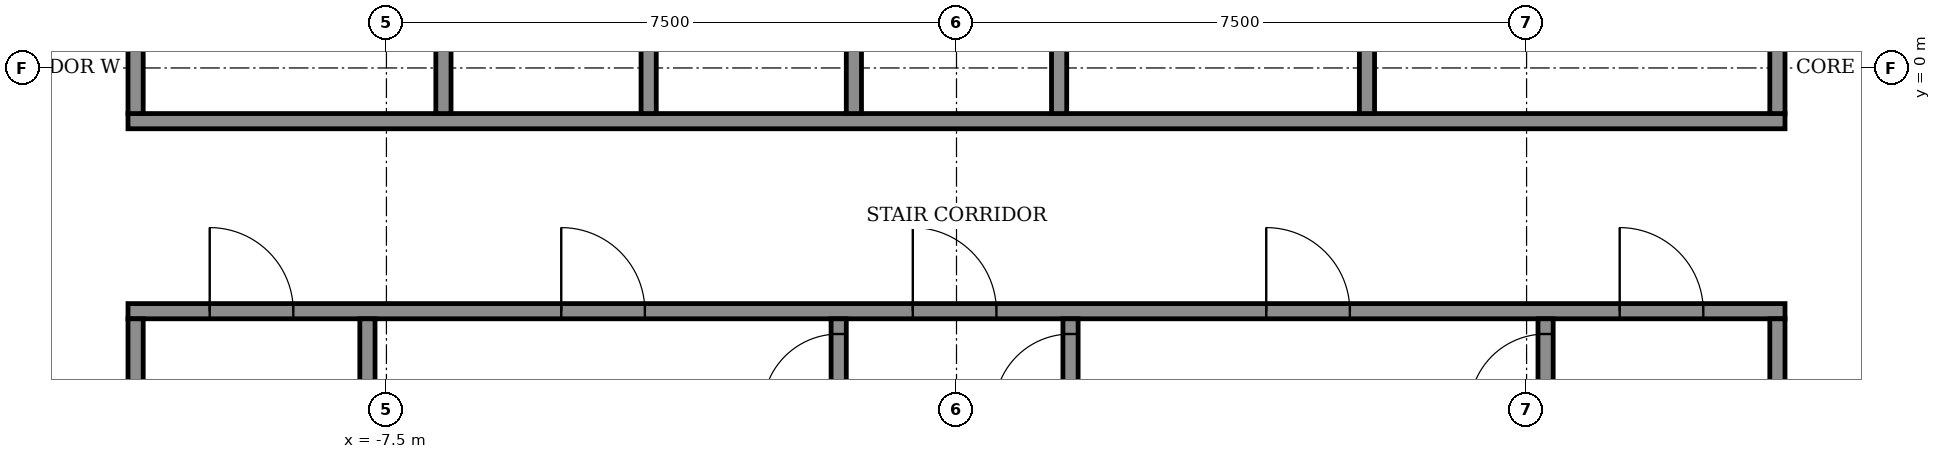
"""IFC4 building model, lengths in metres.
Left out: names, types, materials, properties, quantities, classifications, styles, units other than length and angle.
Written with IfcOpenShell. Run it as: python <this file> out.ifc"""

import sys

from ifc_helpers import new_model, si_unit, direction, frame, frame_2d, origin, place, context, subcontext, project, spatial, rectangle, extrude, element, fill, save


model = new_model("IFC4")
c1 = context("Model", 3, precision=1e-05, world=origin(), true_north=direction((0.0, 1.0)))
c2 = subcontext(c1, "Body", "Model", "MODEL_VIEW")
j1 = project(units=[si_unit("LENGTHUNIT", "METRE"), si_unit("PLANEANGLEUNIT", "RADIAN")], contexts=[c1])
p1 = place(None, origin())
s1 = spatial("IfcSite", under=j1, at=p1, CompositionType="ELEMENT")
p2 = place(p1, origin())
s2 = spatial("IfcBuilding", under=s1, at=p2, CompositionType="ELEMENT")
p3 = place(p2, frame((0.0, 0.0, 238.3)))
s3 = spatial("IfcBuildingStorey", under=s2, at=p3, CompositionType="ELEMENT", Elevation=238.3)
p4 = place(p3, frame((-10.9, -3.2, 0.0), z_axis=(0.0, 0.0, 1.0), x_axis=(1.0, 0.0, 0.0)))
e1 = element("IfcWall", 1, at=p4, inside=s3, PredefinedType="SHEAR", context=c2, shape_type="SweptSolid", body=[
    extrude(rectangle(XDim=21.8, YDim=0.2, at=frame_2d((10.9, 0.0))), origin(), (0.0, 0.0, 1.0), 3.05),
])
p5 = place(p4, frame((1.075, 0.0, 0.0)))
e2 = element("IfcOpeningElement", 2, at=p5, cuts=e1, PredefinedType="OPENING", context=c2, shape_type="SweptSolid", body=[
    extrude(rectangle(XDim=1.1, YDim=2.1, at=frame_2d((0.55, 1.05))), frame((0.0, 0.11, 0.0), z_axis=(0.0, -1.0, 0.0), x_axis=(1.0, 0.0, 0.0)), (0.0, 0.0, 1.0), 0.22),
])
p6 = place(p4, frame((10.325, 0.0, 0.0)))
e3 = element("IfcOpeningElement", 3, at=p6, cuts=e1, PredefinedType="OPENING", context=c2, shape_type="SweptSolid", body=[
    extrude(rectangle(XDim=1.1, YDim=2.1, at=frame_2d((0.55, 1.05))), frame((0.0, 0.11, 0.0), z_axis=(0.0, -1.0, 0.0), x_axis=(1.0, 0.0, 0.0)), (0.0, 0.0, 1.0), 0.22),
])
p7 = place(p4, frame((19.625, 0.0, 0.0)))
e4 = element("IfcOpeningElement", 4, at=p7, cuts=e1, PredefinedType="OPENING", context=c2, shape_type="SweptSolid", body=[
    extrude(rectangle(XDim=1.1, YDim=2.1, at=frame_2d((0.55, 1.05))), frame((0.0, 0.11, 0.0), z_axis=(0.0, -1.0, 0.0), x_axis=(1.0, 0.0, 0.0)), (0.0, 0.0, 1.0), 0.22),
])
p8 = place(p4, frame((5.7, 0.0, 0.0)))
e5 = element("IfcOpeningElement", 5, at=p8, cuts=e1, PredefinedType="OPENING", context=c2, shape_type="SweptSolid", body=[
    extrude(rectangle(XDim=1.1, YDim=2.1, at=frame_2d((0.55, 1.05))), frame((0.0, 0.11, 0.0), z_axis=(0.0, -1.0, 0.0), x_axis=(1.0, 0.0, 0.0)), (0.0, 0.0, 1.0), 0.22),
])
p9 = place(p4, frame((14.975, 0.0, 0.0)))
e6 = element("IfcOpeningElement", 6, at=p9, cuts=e1, PredefinedType="OPENING", context=c2, shape_type="SweptSolid", body=[
    extrude(rectangle(XDim=1.1, YDim=2.1, at=frame_2d((0.55, 1.05))), frame((0.0, 0.11, 0.0), z_axis=(0.0, -1.0, 0.0), x_axis=(1.0, 0.0, 0.0)), (0.0, 0.0, 1.0), 0.22),
])
p10 = place(p3, frame((-10.9, -0.7, 0.0), z_axis=(0.0, 0.0, 1.0), x_axis=(1.0, 0.0, 0.0)))
e7 = element("IfcWall", 7, at=p10, inside=s3, PredefinedType="SHEAR", context=c2, shape_type="SweptSolid", body=[
    extrude(rectangle(XDim=21.8, YDim=0.2, at=frame_2d((10.9, 0.0))), origin(), (0.0, 0.0, 1.0), 3.05),
])
for number, where, z_axis, x_axis in (
    (8, (-10.8, -10.8, 0.0), (0.0, 0.0, 1.0), (0.0, 1.0, 0.0)),
    (9, (-7.75, -10.8, 0.0), (0.0, 0.0, 1.0), (0.0, 1.0, 0.0)),
):
    element("IfcWall", number, at=place(p3, frame(where, z_axis=z_axis, x_axis=x_axis)), inside=s3, PredefinedType="SHEAR", context=c2, shape_type="SweptSolid", body=[
        extrude(rectangle(XDim=7.5, YDim=0.2, at=frame_2d((3.75, 0.0))), origin(), (0.0, 0.0, 1.0), 3.05),
    ])
p11 = place(p3, frame((-1.55, -10.8, 0.0), z_axis=(0.0, 0.0, 1.0), x_axis=(0.0, 1.0, 0.0)))
e10 = element("IfcWall", 10, at=p11, inside=s3, PredefinedType="SHEAR", context=c2, shape_type="SweptSolid", body=[
    extrude(rectangle(XDim=7.5, YDim=0.2, at=frame_2d((3.75, 0.0))), origin(), (0.0, 0.0, 1.0), 3.05),
])
p12 = place(p11, frame((6.3, 0.0, 0.0)))
e11 = element("IfcOpeningElement", 11, at=p12, cuts=e10, PredefinedType="OPENING", context=c2, shape_type="SweptSolid", body=[
    extrude(rectangle(XDim=1.0, YDim=2.1, at=frame_2d((0.5, 1.05))), frame((0.0, 0.11, 0.0), z_axis=(0.0, -1.0, 0.0), x_axis=(1.0, 0.0, 0.0)), (0.0, 0.0, 1.0), 0.22),
])
p13 = place(p3, frame((1.5, -10.8, 0.0), z_axis=(0.0, 0.0, 1.0), x_axis=(0.0, 1.0, 0.0)))
e12 = element("IfcWall", 12, at=p13, inside=s3, PredefinedType="SHEAR", context=c2, shape_type="SweptSolid", body=[
    extrude(rectangle(XDim=7.5, YDim=0.2, at=frame_2d((3.75, 0.0))), origin(), (0.0, 0.0, 1.0), 3.05),
])
p14 = place(p13, frame((6.3, 0.0, 0.0)))
e13 = element("IfcOpeningElement", 13, at=p14, cuts=e12, PredefinedType="OPENING", context=c2, shape_type="SweptSolid", body=[
    extrude(rectangle(XDim=1.0, YDim=2.1, at=frame_2d((0.5, 1.05))), frame((0.0, 0.11, 0.0), z_axis=(0.0, -1.0, 0.0), x_axis=(1.0, 0.0, 0.0)), (0.0, 0.0, 1.0), 0.22),
])
p15 = place(p3, frame((7.75, -10.8, 0.0), z_axis=(0.0, 0.0, 1.0), x_axis=(0.0, 1.0, 0.0)))
e14 = element("IfcWall", 14, at=p15, inside=s3, PredefinedType="SHEAR", context=c2, shape_type="SweptSolid", body=[
    extrude(rectangle(XDim=7.5, YDim=0.2, at=frame_2d((3.75, 0.0))), origin(), (0.0, 0.0, 1.0), 3.05),
])
p16 = place(p15, frame((6.3, 0.0, 0.0)))
e15 = element("IfcOpeningElement", 15, at=p16, cuts=e14, PredefinedType="OPENING", context=c2, shape_type="SweptSolid", body=[
    extrude(rectangle(XDim=1.0, YDim=2.1, at=frame_2d((0.5, 1.05))), frame((0.0, 0.11, 0.0), z_axis=(0.0, -1.0, 0.0), x_axis=(1.0, 0.0, 0.0)), (0.0, 0.0, 1.0), 0.22),
])
p17 = place(p3, frame((10.8, -10.8, 0.0), z_axis=(0.0, 0.0, 1.0), x_axis=(0.0, 1.0, 0.0)))
e16 = element("IfcWall", 16, at=p17, inside=s3, PredefinedType="SHEAR", context=c2, shape_type="SweptSolid", body=[
    extrude(rectangle(XDim=7.5, YDim=0.2, at=frame_2d((3.75, 0.0))), origin(), (0.0, 0.0, 1.0), 3.05),
])
p18 = place(p3, frame((-10.8, -0.6, 0.0), z_axis=(0.0, 0.0, 1.0), x_axis=(0.0, 1.0, 0.0)))
e17 = element("IfcWall", 17, at=p18, inside=s3, PredefinedType="STANDARD", context=c2, shape_type="SweptSolid", body=[
    extrude(rectangle(XDim=2.5, YDim=0.2, at=frame_2d((1.25, 0.0))), origin(), (0.0, 0.0, 1.0), 3.05),
])
for number, where, z_axis, x_axis in (
    (18, (-6.75, -0.6, 0.0), (0.0, 0.0, 1.0), (0.0, 1.0, 0.0)),
    (19, (-4.05, -0.6, 0.0), (0.0, 0.0, 1.0), (0.0, 1.0, 0.0)),
    (20, (-1.35, -0.6, 0.0), (0.0, 0.0, 1.0), (0.0, 1.0, 0.0)),
    (21, (1.35, -0.6, 0.0), (0.0, 0.0, 1.0), (0.0, 1.0, 0.0)),
):
    element("IfcWall", number, at=place(p3, frame(where, z_axis=z_axis, x_axis=x_axis)), inside=s3, PredefinedType="SHEAR", context=c2, shape_type="SweptSolid", body=[
        extrude(rectangle(XDim=2.5, YDim=0.2, at=frame_2d((1.25, 0.0))), origin(), (0.0, 0.0, 1.0), 3.05),
    ])
for number, where, z_axis, x_axis in (
    (22, (5.4, -0.6, 0.0), (0.0, 0.0, 1.0), (0.0, 1.0, 0.0)),
    (23, (10.8, -0.6, 0.0), (0.0, 0.0, 1.0), (0.0, 1.0, 0.0)),
):
    element("IfcWall", number, at=place(p3, frame(where, z_axis=z_axis, x_axis=x_axis)), inside=s3, PredefinedType="STANDARD", context=c2, shape_type="SweptSolid", body=[
        extrude(rectangle(XDim=2.5, YDim=0.2, at=frame_2d((1.25, 0.0))), origin(), (0.0, 0.0, 1.0), 3.05),
    ])
p19 = place(p5, origin())
e24 = element("IfcDoor", 24, at=p19, inside=s3, OperationType="SINGLE_SWING_RIGHT", PredefinedType="DOOR", context=c2, shape_type="SweptSolid", body=[
    extrude(rectangle(XDim=1.1, YDim=2.1, at=frame_2d((0.55, 1.05))), frame((0.0, 0.025, 0.0), z_axis=(0.0, -1.0, 0.0), x_axis=(1.0, 0.0, 0.0)), (0.0, 0.0, 1.0), 0.05),
])
fill(e2, e24)
p20 = place(p6, origin())
e25 = element("IfcDoor", 25, at=p20, inside=s3, OperationType="SINGLE_SWING_RIGHT", PredefinedType="DOOR", context=c2, shape_type="SweptSolid", body=[
    extrude(rectangle(XDim=1.1, YDim=2.1, at=frame_2d((0.55, 1.05))), frame((0.0, 0.025, 0.0), z_axis=(0.0, -1.0, 0.0), x_axis=(1.0, 0.0, 0.0)), (0.0, 0.0, 1.0), 0.05),
])
fill(e3, e25)
p21 = place(p7, origin())
e26 = element("IfcDoor", 26, at=p21, inside=s3, OperationType="SINGLE_SWING_RIGHT", PredefinedType="DOOR", context=c2, shape_type="SweptSolid", body=[
    extrude(rectangle(XDim=1.1, YDim=2.1, at=frame_2d((0.55, 1.05))), frame((0.0, 0.025, 0.0), z_axis=(0.0, -1.0, 0.0), x_axis=(1.0, 0.0, 0.0)), (0.0, 0.0, 1.0), 0.05),
])
fill(e4, e26)
p22 = place(p8, origin())
e27 = element("IfcDoor", 27, at=p22, inside=s3, OperationType="SINGLE_SWING_LEFT", PredefinedType="DOOR", context=c2, shape_type="SweptSolid", body=[
    extrude(rectangle(XDim=1.1, YDim=2.1, at=frame_2d((0.55, 1.05))), frame((0.0, 0.025, 0.0), z_axis=(0.0, -1.0, 0.0), x_axis=(1.0, 0.0, 0.0)), (0.0, 0.0, 1.0), 0.05),
])
fill(e5, e27)
p23 = place(p9, origin())
e28 = element("IfcDoor", 28, at=p23, inside=s3, OperationType="SINGLE_SWING_LEFT", PredefinedType="DOOR", context=c2, shape_type="SweptSolid", body=[
    extrude(rectangle(XDim=1.1, YDim=2.1, at=frame_2d((0.55, 1.05))), frame((0.0, 0.025, 0.0), z_axis=(0.0, -1.0, 0.0), x_axis=(1.0, 0.0, 0.0)), (0.0, 0.0, 1.0), 0.05),
])
fill(e6, e28)
p24 = place(p12, origin())
e29 = element("IfcDoor", 29, at=p24, inside=s3, OperationType="SINGLE_SWING_RIGHT", PredefinedType="DOOR", context=c2, shape_type="SweptSolid", body=[
    extrude(rectangle(XDim=1.0, YDim=2.1, at=frame_2d((0.5, 1.05))), frame((0.0, 0.025, 0.0), z_axis=(0.0, -1.0, 0.0), x_axis=(1.0, 0.0, 0.0)), (0.0, 0.0, 1.0), 0.05),
])
fill(e11, e29)
p25 = place(p14, origin())
e30 = element("IfcDoor", 30, at=p25, inside=s3, OperationType="SINGLE_SWING_RIGHT", PredefinedType="DOOR", context=c2, shape_type="SweptSolid", body=[
    extrude(rectangle(XDim=1.0, YDim=2.1, at=frame_2d((0.5, 1.05))), frame((0.0, 0.025, 0.0), z_axis=(0.0, -1.0, 0.0), x_axis=(1.0, 0.0, 0.0)), (0.0, 0.0, 1.0), 0.05),
])
fill(e13, e30)
p26 = place(p16, origin())
e31 = element("IfcDoor", 31, at=p26, inside=s3, OperationType="SINGLE_SWING_RIGHT", PredefinedType="DOOR", context=c2, shape_type="SweptSolid", body=[
    extrude(rectangle(XDim=1.0, YDim=2.1, at=frame_2d((0.5, 1.05))), frame((0.0, 0.025, 0.0), z_axis=(0.0, -1.0, 0.0), x_axis=(1.0, 0.0, 0.0)), (0.0, 0.0, 1.0), 0.05),
])
fill(e15, e31)
save(model, sys.argv[1])
